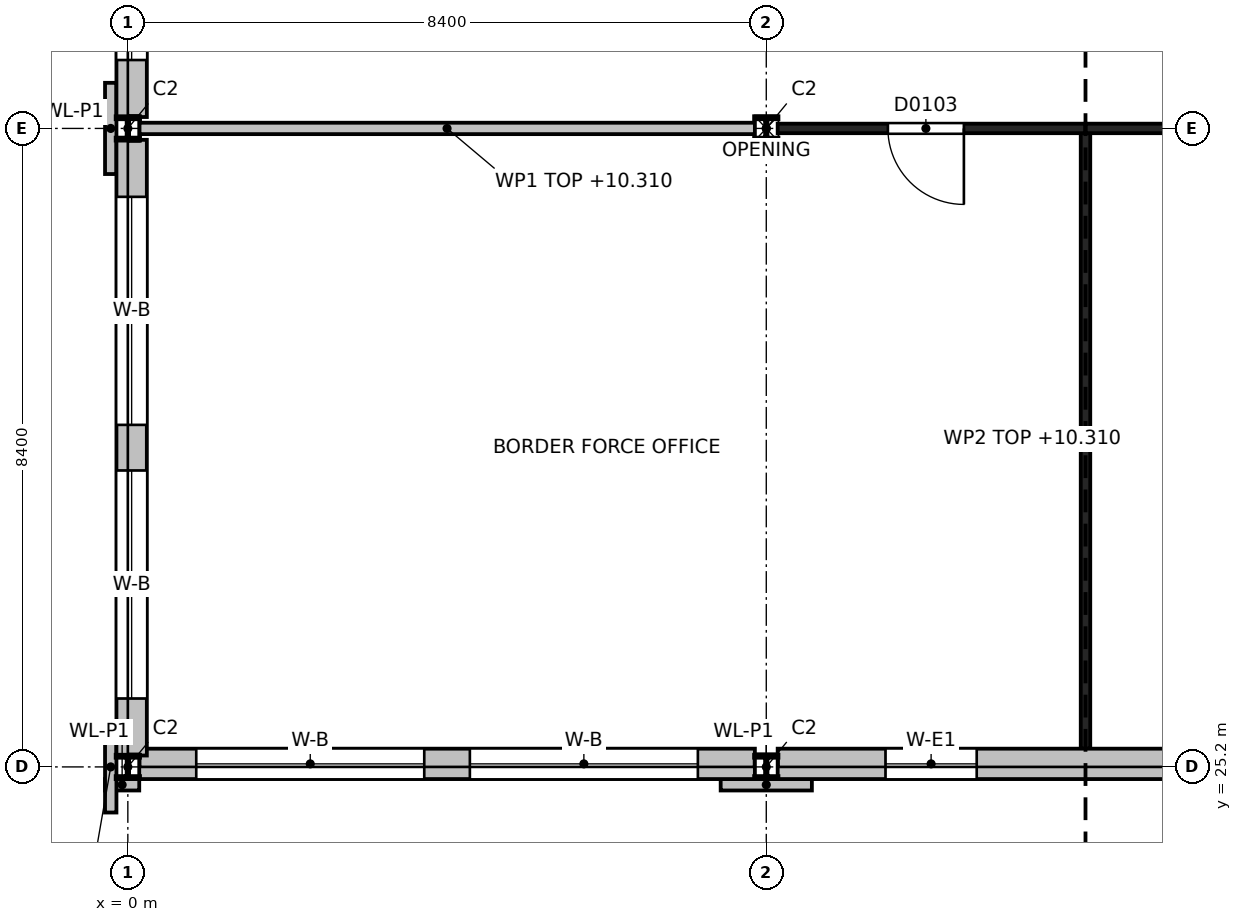
"""IFC4 building model, lengths in metres.
Left out: names, types, materials, properties, quantities, classifications, styles, units other than length and angle.
Written with IfcOpenShell. Run it as: python <this file> out.ifc"""

import sys

from ifc_helpers import new_model, si_unit, direction, frame, frame_2d, origin, origin_2d, place, context, subcontext, project, spatial, rectangle, i_section, extrude, element, fill, save


model = new_model("IFC4")
c1 = context("Model", 3, precision=1e-05, world=origin(), true_north=direction((0.0, 1.0)))
c2 = subcontext(c1, "Body", "Model", "MODEL_VIEW")
j1 = project(units=[si_unit("LENGTHUNIT", "METRE"), si_unit("PLANEANGLEUNIT", "RADIAN")], contexts=[c1])
p1 = place(None, origin())
s1 = spatial("IfcSite", under=j1, at=p1, CompositionType="ELEMENT")
p2 = place(p1, origin())
s2 = spatial("IfcBuilding", under=s1, at=p2, CompositionType="ELEMENT")
p3 = place(p2, frame((0.0, 0.0, 6.0)))
s3 = spatial("IfcBuildingStorey", under=s2, at=p3, CompositionType="ELEMENT", Elevation=6.0)
for number, where, z_axis, x_axis in (
    (1, (0.0, 25.2, 0.0), (0.0, 0.0, 1.0), (1.0, 0.0, 0.0)),
    (2, (0.0, 33.6, 0.0), (0.0, 0.0, 1.0), (1.0, 0.0, 0.0)),
    (3, (8.4, 25.2, 0.0), (0.0, 0.0, 1.0), (1.0, 0.0, 0.0)),
    (4, (8.4, 33.6, 0.0), (0.0, 0.0, 1.0), (1.0, 0.0, 0.0)),
):
    element("IfcColumn", number, at=place(p3, frame(where, z_axis=z_axis, x_axis=x_axis)), inside=s3, PredefinedType="COLUMN", context=c2, shape_type="SweptSolid", body=[
        extrude(i_section(OverallWidth=0.3, OverallDepth=0.3, WebThickness=0.011, FlangeThickness=0.019, at=origin_2d()), origin(), (0.0, 0.0, 1.0), 4.8),
    ])
p4 = place(p3, frame((0.15, 25.24, 0.0), z_axis=(0.0, 0.0, 1.0), x_axis=(1.0, 0.0, 0.0)))
e5 = element("IfcWall", 5, at=p4, inside=s3, PredefinedType="SOLIDWALL", context=c2, shape_type="SweptSolid", body=[
    extrude(rectangle(XDim=8.1, YDim=0.4, at=frame_2d((4.05, 0.0))), origin(), (0.0, 0.0, 1.0), 4.05),
])
p5 = place(p4, frame((0.75, 0.0, 0.9)))
e6 = element("IfcOpeningElement", 6, at=p5, cuts=e5, PredefinedType="OPENING", context=c2, shape_type="SweptSolid", body=[
    extrude(rectangle(XDim=3.0, YDim=3.0, at=frame_2d((1.5, 1.5))), frame((0.0, 0.2, 0.0), z_axis=(0.0, -1.0, 0.0), x_axis=(1.0, 0.0, 0.0)), (0.0, 0.0, 1.0), 0.4),
])
p6 = place(p4, frame((4.35, 0.0, 0.9)))
e7 = element("IfcOpeningElement", 7, at=p6, cuts=e5, PredefinedType="OPENING", context=c2, shape_type="SweptSolid", body=[
    extrude(rectangle(XDim=3.0, YDim=3.0, at=frame_2d((1.5, 1.5))), frame((0.0, 0.2, 0.0), z_axis=(0.0, -1.0, 0.0), x_axis=(1.0, 0.0, 0.0)), (0.0, 0.0, 1.0), 0.4),
])
p7 = place(p3, frame((8.55, 25.24, 0.0), z_axis=(0.0, 0.0, 1.0), x_axis=(1.0, 0.0, 0.0)))
e8 = element("IfcWall", 8, at=p7, inside=s3, PredefinedType="SOLIDWALL", context=c2, shape_type="SweptSolid", body=[
    extrude(rectangle(XDim=8.1, YDim=0.4, at=frame_2d((4.05, 0.0))), origin(), (0.0, 0.0, 1.0), 4.05),
])
p8 = place(p7, frame((1.419, 0.0, 0.9)))
e9 = element("IfcOpeningElement", 9, at=p8, cuts=e8, PredefinedType="OPENING", context=c2, shape_type="SweptSolid", body=[
    extrude(rectangle(XDim=1.2, YDim=3.0, at=frame_2d((0.6, 1.5))), frame((0.0, 0.2, 0.0), z_axis=(0.0, -1.0, 0.0), x_axis=(1.0, 0.0, 0.0)), (0.0, 0.0, 1.0), 0.4),
])
p9 = place(p7, frame((5.481, 0.0, 0.9)))
e10 = element("IfcOpeningElement", 10, at=p9, cuts=e8, PredefinedType="OPENING", context=c2, shape_type="SweptSolid", body=[
    extrude(rectangle(XDim=1.2, YDim=3.0, at=frame_2d((0.6, 1.5))), frame((0.0, 0.2, 0.0), z_axis=(0.0, -1.0, 0.0), x_axis=(1.0, 0.0, 0.0)), (0.0, 0.0, 1.0), 0.4),
])
p10 = place(p3, frame((-0.3, 24.965, 0.0), z_axis=(0.0, 0.0, 1.0), x_axis=(1.0, 0.0, 0.0)))
e11 = element("IfcWall", 11, at=p10, inside=s3, PredefinedType="SOLIDWALL", context=c2, shape_type="SweptSolid", body=[
    extrude(rectangle(XDim=0.45, YDim=0.15, at=frame_2d((0.225, 0.0))), origin(), (0.0, 0.0, 1.0), 4.8),
])
p11 = place(p3, frame((7.8, 24.965, 0.0), z_axis=(0.0, 0.0, 1.0), x_axis=(1.0, 0.0, 0.0)))
e12 = element("IfcWall", 12, at=p11, inside=s3, PredefinedType="SOLIDWALL", context=c2, shape_type="SweptSolid", body=[
    extrude(rectangle(XDim=1.2, YDim=0.15, at=frame_2d((0.6, 0.0))), origin(), (0.0, 0.0, 1.0), 4.8),
])
p12 = place(p3, frame((0.05, 25.35, 0.0), z_axis=(0.0, 0.0, 1.0), x_axis=(0.0, 1.0, 0.0)))
e13 = element("IfcWall", 13, at=p12, inside=s3, PredefinedType="SOLIDWALL", context=c2, shape_type="SweptSolid", body=[
    extrude(rectangle(XDim=8.1, YDim=0.4, at=frame_2d((4.05, 0.0))), origin(), (0.0, 0.0, 1.0), 4.05),
])
p13 = place(p12, frame((0.75, 0.0, 0.9)))
e14 = element("IfcOpeningElement", 14, at=p13, cuts=e13, PredefinedType="OPENING", context=c2, shape_type="SweptSolid", body=[
    extrude(rectangle(XDim=3.0, YDim=3.0, at=frame_2d((1.5, 1.5))), frame((0.0, 0.2, 0.0), z_axis=(0.0, -1.0, 0.0), x_axis=(1.0, 0.0, 0.0)), (0.0, 0.0, 1.0), 0.4),
])
p14 = place(p12, frame((4.35, 0.0, 0.9)))
e15 = element("IfcOpeningElement", 15, at=p14, cuts=e13, PredefinedType="OPENING", context=c2, shape_type="SweptSolid", body=[
    extrude(rectangle(XDim=3.0, YDim=3.0, at=frame_2d((1.5, 1.5))), frame((0.0, 0.2, 0.0), z_axis=(0.0, -1.0, 0.0), x_axis=(1.0, 0.0, 0.0)), (0.0, 0.0, 1.0), 0.4),
])
p15 = place(p3, frame((0.05, 33.75, 0.0), z_axis=(0.0, 0.0, 1.0), x_axis=(0.0, 1.0, 0.0)))
e16 = element("IfcWall", 16, at=p15, inside=s3, PredefinedType="SOLIDWALL", context=c2, shape_type="SweptSolid", body=[
    extrude(rectangle(XDim=8.45, YDim=0.4, at=frame_2d((4.225, 0.0))), origin(), (0.0, 0.0, 1.0), 4.05),
])
p16 = place(p15, frame((0.75, 0.0, 0.9)))
e17 = element("IfcOpeningElement", 17, at=p16, cuts=e16, PredefinedType="OPENING", context=c2, shape_type="SweptSolid", body=[
    extrude(rectangle(XDim=3.0, YDim=3.0, at=frame_2d((1.5, 1.5))), frame((0.0, 0.2, 0.0), z_axis=(0.0, -1.0, 0.0), x_axis=(1.0, 0.0, 0.0)), (0.0, 0.0, 1.0), 0.4),
])
p17 = place(p15, frame((4.35, 0.0, 0.9)))
e18 = element("IfcOpeningElement", 18, at=p17, cuts=e16, PredefinedType="OPENING", context=c2, shape_type="SweptSolid", body=[
    extrude(rectangle(XDim=3.0, YDim=3.0, at=frame_2d((1.5, 1.5))), frame((0.0, 0.2, 0.0), z_axis=(0.0, -1.0, 0.0), x_axis=(1.0, 0.0, 0.0)), (0.0, 0.0, 1.0), 0.4),
])
for number, where, z_axis, x_axis in (
    (19, (-0.225, 24.6, 0.0), (0.0, 0.0, 1.0), (0.0, 1.0, 0.0)),
    (20, (-0.225, 33.0, 0.0), (0.0, 0.0, 1.0), (0.0, 1.0, 0.0)),
):
    element("IfcWall", number, at=place(p3, frame(where, z_axis=z_axis, x_axis=x_axis)), inside=s3, PredefinedType="SOLIDWALL", context=c2, shape_type="SweptSolid", body=[
        extrude(rectangle(XDim=1.2, YDim=0.15, at=frame_2d((0.6, 0.0))), origin(), (0.0, 0.0, 1.0), 4.8),
    ])
p18 = place(p3, frame((12.6, 25.44, 0.0), z_axis=(0.0, 0.0, 1.0), x_axis=(0.0, 1.0, 0.0)))
e21 = element("IfcWall", 21, at=p18, inside=s3, PredefinedType="PARTITIONING", context=c2, shape_type="SweptSolid", body=[
    extrude(rectangle(XDim=8.16, YDim=0.125, at=frame_2d((4.08, 0.0))), origin(), (0.0, 0.0, 1.0), 4.31),
])
p19 = place(p3, frame((0.15, 33.6, 0.0), z_axis=(0.0, 0.0, 1.0), x_axis=(1.0, 0.0, 0.0)))
e22 = element("IfcWall", 22, at=p19, inside=s3, PredefinedType="PARTITIONING", context=c2, shape_type="SweptSolid", body=[
    extrude(rectangle(XDim=8.1, YDim=0.15, at=frame_2d((4.05, 0.0))), origin(), (0.0, 0.0, 1.0), 4.31),
])
p20 = place(p3, frame((8.55, 33.6, 0.0), z_axis=(0.0, 0.0, 1.0), x_axis=(1.0, 0.0, 0.0)))
e23 = element("IfcWall", 23, at=p20, inside=s3, PredefinedType="PARTITIONING", context=c2, shape_type="SweptSolid", body=[
    extrude(rectangle(XDim=4.05, YDim=0.125, at=frame_2d((2.025, 0.0))), origin(), (0.0, 0.0, 1.0), 4.31),
])
p21 = place(p20, frame((1.45, 0.0, 0.0)))
e24 = element("IfcOpeningElement", 24, at=p21, cuts=e23, PredefinedType="OPENING", context=c2, shape_type="SweptSolid", body=[
    extrude(rectangle(XDim=1.0, YDim=2.2, at=frame_2d((0.5, 1.1))), frame((0.0, 0.062, 0.0), z_axis=(0.0, -1.0, 0.0), x_axis=(1.0, 0.0, 0.0)), (0.0, 0.0, 1.0), 0.125),
])
p22 = place(p3, frame((12.6, 33.6, 0.0), z_axis=(0.0, 0.0, 1.0), x_axis=(1.0, 0.0, 0.0)))
e25 = element("IfcWall", 25, at=p22, inside=s3, PredefinedType="PARTITIONING", context=c2, shape_type="SweptSolid", body=[
    extrude(rectangle(XDim=4.05, YDim=0.125, at=frame_2d((2.025, 0.0))), origin(), (0.0, 0.0, 1.0), 4.31),
])
p23 = place(p5, origin())
e26 = element("IfcWindow", 26, at=p23, inside=s3, PartitioningType="SINGLE_PANEL", PredefinedType="WINDOW", context=c2, shape_type="SweptSolid", body=[
    extrude(rectangle(XDim=3.0, YDim=3.0, at=frame_2d((1.5, 1.5))), frame((0.0, 0.03, 0.0), z_axis=(0.0, -1.0, 0.0), x_axis=(1.0, 0.0, 0.0)), (0.0, 0.0, 1.0), 0.06),
])
fill(e6, e26)
p24 = place(p6, origin())
e27 = element("IfcWindow", 27, at=p24, inside=s3, PartitioningType="SINGLE_PANEL", PredefinedType="WINDOW", context=c2, shape_type="SweptSolid", body=[
    extrude(rectangle(XDim=3.0, YDim=3.0, at=frame_2d((1.5, 1.5))), frame((0.0, 0.03, 0.0), z_axis=(0.0, -1.0, 0.0), x_axis=(1.0, 0.0, 0.0)), (0.0, 0.0, 1.0), 0.06),
])
fill(e7, e27)
p25 = place(p8, origin())
e28 = element("IfcWindow", 28, at=p25, inside=s3, PartitioningType="SINGLE_PANEL", PredefinedType="WINDOW", context=c2, shape_type="SweptSolid", body=[
    extrude(rectangle(XDim=1.2, YDim=3.0, at=frame_2d((0.6, 1.5))), frame((0.0, 0.03, 0.0), z_axis=(0.0, -1.0, 0.0), x_axis=(1.0, 0.0, 0.0)), (0.0, 0.0, 1.0), 0.06),
])
fill(e9, e28)
p26 = place(p13, origin())
e29 = element("IfcWindow", 29, at=p26, inside=s3, PartitioningType="SINGLE_PANEL", PredefinedType="WINDOW", context=c2, shape_type="SweptSolid", body=[
    extrude(rectangle(XDim=3.0, YDim=3.0, at=frame_2d((1.5, 1.5))), frame((0.0, 0.03, 0.0), z_axis=(0.0, -1.0, 0.0), x_axis=(1.0, 0.0, 0.0)), (0.0, 0.0, 1.0), 0.06),
])
fill(e14, e29)
p27 = place(p14, origin())
e30 = element("IfcWindow", 30, at=p27, inside=s3, PartitioningType="SINGLE_PANEL", PredefinedType="WINDOW", context=c2, shape_type="SweptSolid", body=[
    extrude(rectangle(XDim=3.0, YDim=3.0, at=frame_2d((1.5, 1.5))), frame((0.0, 0.03, 0.0), z_axis=(0.0, -1.0, 0.0), x_axis=(1.0, 0.0, 0.0)), (0.0, 0.0, 1.0), 0.06),
])
fill(e15, e30)
p28 = place(p16, origin())
e31 = element("IfcWindow", 31, at=p28, inside=s3, PartitioningType="SINGLE_PANEL", PredefinedType="WINDOW", context=c2, shape_type="SweptSolid", body=[
    extrude(rectangle(XDim=3.0, YDim=3.0, at=frame_2d((1.5, 1.5))), frame((0.0, 0.03, 0.0), z_axis=(0.0, -1.0, 0.0), x_axis=(1.0, 0.0, 0.0)), (0.0, 0.0, 1.0), 0.06),
])
fill(e17, e31)
p29 = place(p21, origin())
e32 = element("IfcDoor", 32, at=p29, inside=s3, OperationType="SINGLE_SWING_RIGHT", PredefinedType="DOOR", context=c2, shape_type="SweptSolid", body=[
    extrude(rectangle(XDim=1.0, YDim=2.2, at=frame_2d((0.5, 1.1))), frame((0.0, 0.025, 0.0), z_axis=(0.0, -1.0, 0.0), x_axis=(1.0, 0.0, 0.0)), (0.0, 0.0, 1.0), 0.05),
])
fill(e24, e32)
save(model, sys.argv[1])
